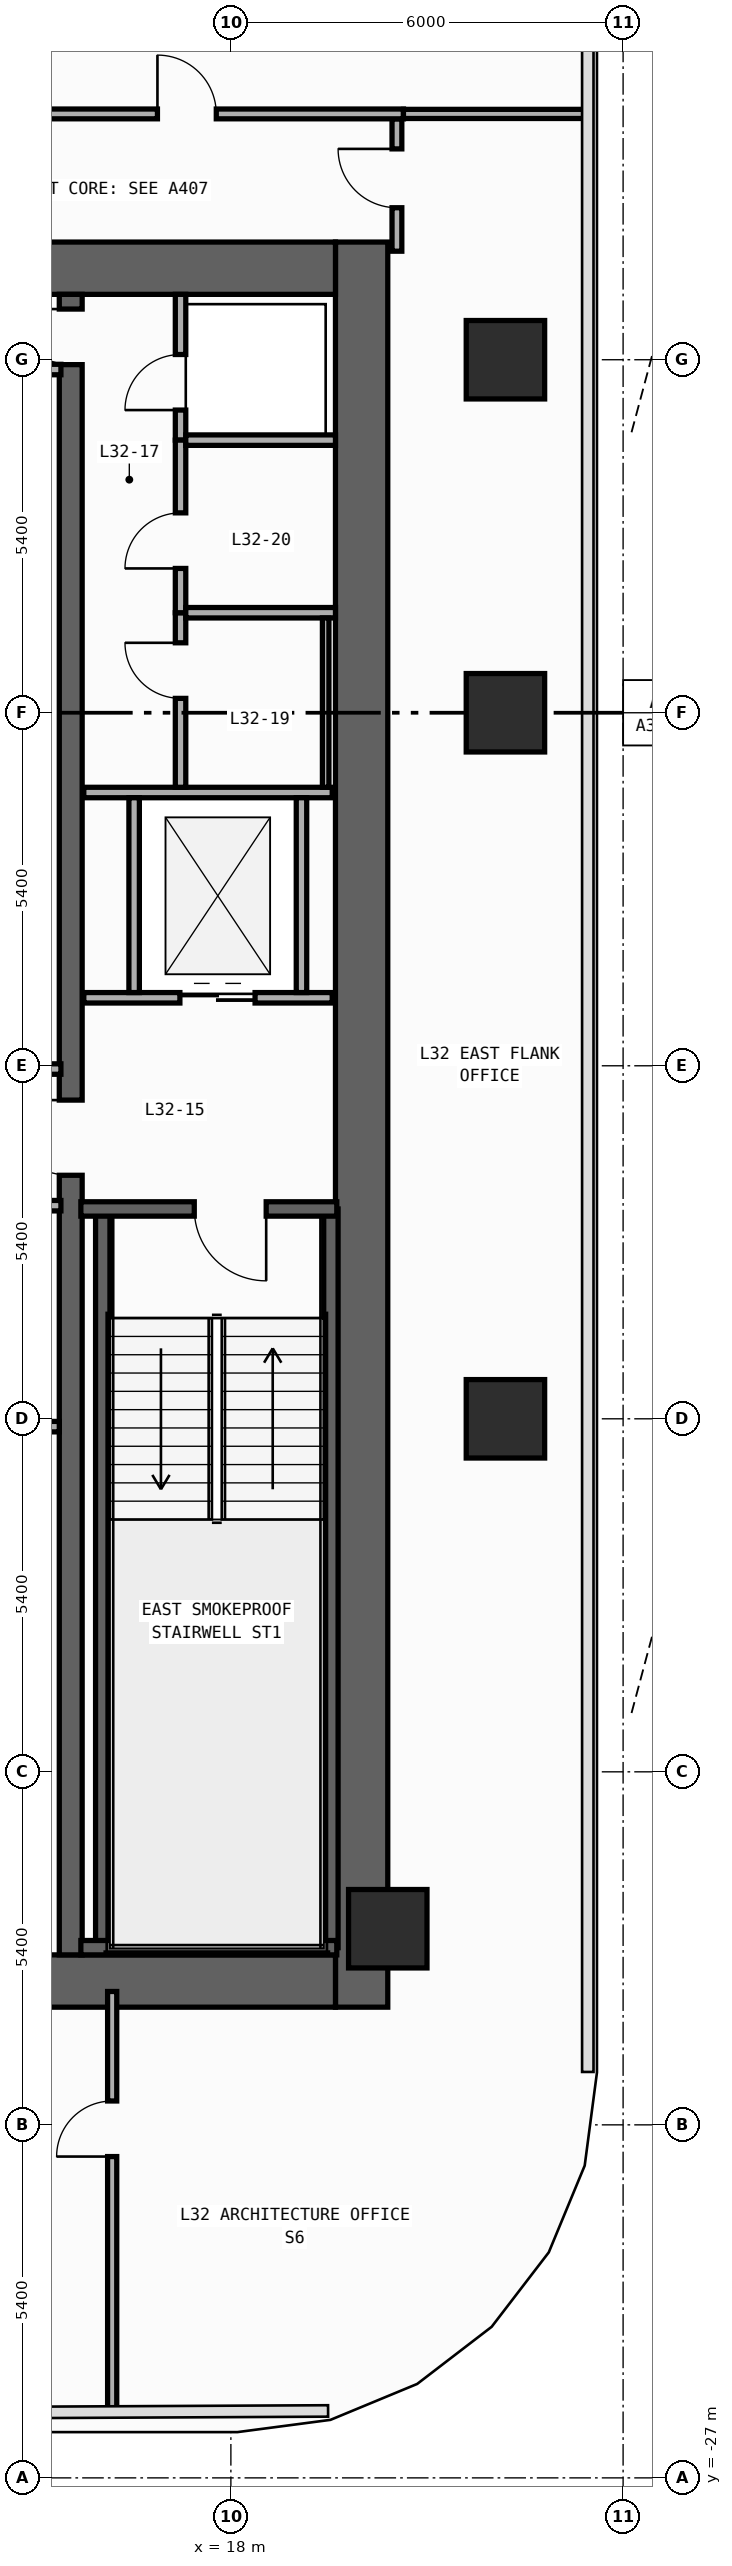
"""IFC4 building model, lengths in metres.
Left out: names, types, materials, properties, quantities, classifications, styles, units other than length and angle.
Written with IfcOpenShell. Run it as: python <this file> out.ifc"""

import sys

from ifc_helpers import new_model, si_unit, direction, frame, frame_2d, origin, origin_2d, place, context, subcontext, project, spatial, rectangle, extrude, element, fill, save


model = new_model("IFC4")
c1 = context("Model", 3, precision=1e-05, world=origin(), true_north=direction((0.0, 1.0)))
c2 = subcontext(c1, "Body", "Model", "MODEL_VIEW")
j1 = project(units=[si_unit("LENGTHUNIT", "METRE"), si_unit("PLANEANGLEUNIT", "RADIAN")], contexts=[c1])
p1 = place(None, origin())
s1 = spatial("IfcSite", under=j1, at=p1, CompositionType="ELEMENT")
p2 = place(p1, origin())
s2 = spatial("IfcBuilding", under=s1, at=p2, CompositionType="ELEMENT")
p3 = place(p2, frame((0.0, 0.0, 139.4)))
s3 = spatial("IfcBuildingStorey", under=s2, at=p3, CompositionType="ELEMENT", Elevation=139.4)
p4 = place(p3, frame((20.0, -19.8, 0.0), z_axis=(0.0, 0.0, 1.0), x_axis=(0.0, 1.0, 0.0)))
e1 = element("IfcWall", 1, at=p4, inside=s3, PredefinedType="SHEAR", context=c2, shape_type="SweptSolid", body=[
    extrude(rectangle(XDim=27.0, YDim=0.8, at=frame_2d((13.5, 0.0))), origin(), (0.0, 0.0, 1.0), 3.94),
])
for number, where, z_axis, x_axis in (
    (2, (12.8, -19.4, 0.0), (0.0, 0.0, 1.0), (1.0, 0.0, 0.0)),
    (3, (12.8, 6.8, 0.0), (0.0, 0.0, 1.0), (1.0, 0.0, 0.0)),
):
    element("IfcWall", number, at=place(p3, frame(where, z_axis=z_axis, x_axis=x_axis)), inside=s3, PredefinedType="SHEAR", context=c2, shape_type="SweptSolid", body=[
        extrude(rectangle(XDim=6.8, YDim=0.8, at=frame_2d((3.4, 0.0))), origin(), (0.0, 0.0, 1.0), 3.94),
    ])
p5 = place(p3, frame((15.55, -19.0, 0.0), z_axis=(0.0, 0.0, 1.0), x_axis=(0.0, 1.0, 0.0)))
e4 = element("IfcWall", 4, at=p5, inside=s3, PredefinedType="SHEAR", context=c2, shape_type="SweptSolid", body=[
    extrude(rectangle(XDim=25.4, YDim=0.35, at=frame_2d((12.7, 0.0))), origin(), (0.0, 0.0, 1.0), 3.94),
])
p6 = place(p5, frame((11.925, 0.0, 0.0)))
e5 = element("IfcOpeningElement", 5, at=p6, cuts=e4, PredefinedType="OPENING", context=c2, shape_type="SweptSolid", body=[
    extrude(rectangle(XDim=1.15, YDim=2.2, at=frame_2d((0.575, 1.1))), frame((0.0, 0.185, 0.0), z_axis=(0.0, -1.0, 0.0), x_axis=(1.0, 0.0, 0.0)), (0.0, 0.0, 1.0), 0.37),
])
p7 = place(p5, frame((24.325, 0.0, 0.0)))
e6 = element("IfcOpeningElement", 6, at=p7, cuts=e4, PredefinedType="OPENING", context=c2, shape_type="SweptSolid", body=[
    extrude(rectangle(XDim=0.85, YDim=2.1, at=frame_2d((0.425, 1.05))), frame((0.0, 0.185, 0.0), z_axis=(0.0, -1.0, 0.0), x_axis=(1.0, 0.0, 0.0)), (0.0, 0.0, 1.0), 0.37),
])
for number, where, z_axis, x_axis in (
    (7, (16.04, -18.89, 0.0), (0.0, 0.0, 1.0), (0.0, 1.0, 0.0)),
    (8, (19.53, -18.89, 0.0), (0.0, 0.0, 1.0), (0.0, 1.0, 0.0)),
):
    element("IfcWall", number, at=place(p3, frame(where, z_axis=z_axis, x_axis=x_axis)), inside=s3, PredefinedType="SHEAR", context=c2, shape_type="SweptSolid", body=[
        extrude(rectangle(XDim=11.3, YDim=0.22, at=frame_2d((5.65, 0.0))), origin(), (0.0, 0.0, 1.0), 3.94),
    ])
p8 = place(p3, frame((15.705, -18.89, 0.0), z_axis=(0.0, 0.0, 1.0), x_axis=(1.0, 0.0, 0.0)))
e9 = element("IfcWall", 9, at=p8, inside=s3, PredefinedType="SHEAR", context=c2, shape_type="SweptSolid", body=[
    extrude(rectangle(XDim=3.915, YDim=0.22, at=frame_2d((1.958, 0.0))), origin(), (0.0, 0.0, 1.0), 3.94),
])
p9 = place(p3, frame((19.62, -7.59, 0.0), z_axis=(0.0, 0.0, 1.0), x_axis=(-1.0, 0.0, 0.0)))
e10 = element("IfcWall", 10, at=p9, inside=s3, PredefinedType="SHEAR", context=c2, shape_type="SweptSolid", body=[
    extrude(rectangle(XDim=3.915, YDim=0.22, at=frame_2d((1.958, 0.0))), origin(), (0.0, 0.0, 1.0), 3.94),
])
p10 = place(p9, frame((1.08, 0.0, 0.0)))
e11 = element("IfcOpeningElement", 11, at=p10, cuts=e10, PredefinedType="OPENING", context=c2, shape_type="SweptSolid", body=[
    extrude(rectangle(XDim=1.1, YDim=2.2, at=frame_2d((0.55, 1.1))), frame((0.0, 0.12, 0.0), z_axis=(0.0, -1.0, 0.0), x_axis=(1.0, 0.0, 0.0)), (0.0, 0.0, 1.0), 0.24),
])
for number, where, z_axis, x_axis in (
    (12, (20.4, -18.6, 0.0), (0.0, 0.0, 1.0), (1.0, 0.0, 0.0)),
    (13, (22.2, -10.8, 0.0), (0.0, 0.0, 1.0), (1.0, 0.0, 0.0)),
    (14, (22.2, 0.0, 0.0), (0.0, 0.0, 1.0), (1.0, 0.0, 0.0)),
    (15, (22.2, 5.4, 0.0), (0.0, 0.0, 1.0), (1.0, 0.0, 0.0)),
):
    element("IfcColumn", number, at=place(p3, frame(where, z_axis=z_axis, x_axis=x_axis)), inside=s3, PredefinedType="COLUMN", context=c2, shape_type="SweptSolid", body=[
        extrude(rectangle(XDim=1.2, YDim=1.2, at=origin_2d()), origin(), (0.0, 0.0, 1.0), 4.2),
    ])
p11 = place(p3, frame((15.75, -4.36, 0.0), z_axis=(0.0, 0.0, 1.0), x_axis=(1.0, 0.0, 0.0)))
e16 = element("IfcWall", 16, at=p11, inside=s3, PredefinedType="STANDARD", context=c2, shape_type="SweptSolid", body=[
    extrude(rectangle(XDim=3.8, YDim=0.16, at=frame_2d((1.9, 0.0))), origin(), (0.0, 0.0, 1.0), 3.94),
])
p12 = place(p11, frame((1.47, 0.0, 0.0)))
e17 = element("IfcOpeningElement", 17, at=p12, cuts=e16, PredefinedType="OPENING", context=c2, shape_type="SweptSolid", body=[
    extrude(rectangle(XDim=1.15, YDim=2.2, at=frame_2d((0.575, 1.1))), frame((0.0, 0.09, 0.0), z_axis=(0.0, -1.0, 0.0), x_axis=(1.0, 0.0, 0.0)), (0.0, 0.0, 1.0), 0.18),
])
p13 = place(p3, frame((15.75, -1.22, 0.0), z_axis=(0.0, 0.0, 1.0), x_axis=(1.0, 0.0, 0.0)))
e18 = element("IfcWall", 18, at=p13, inside=s3, PredefinedType="STANDARD", context=c2, shape_type="SweptSolid", body=[
    extrude(rectangle(XDim=3.8, YDim=0.16, at=frame_2d((1.9, 0.0))), origin(), (0.0, 0.0, 1.0), 3.94),
])
for number, where, z_axis, x_axis in (
    (19, (16.52, -4.28, 0.0), (0.0, 0.0, 1.0), (0.0, 1.0, 0.0)),
    (20, (19.08, -4.28, 0.0), (0.0, 0.0, 1.0), (0.0, 1.0, 0.0)),
):
    element("IfcWall", number, at=place(p3, frame(where, z_axis=z_axis, x_axis=x_axis)), inside=s3, PredefinedType="STANDARD", context=c2, shape_type="SweptSolid", body=[
        extrude(rectangle(XDim=2.98, YDim=0.16, at=frame_2d((1.49, 0.0))), origin(), (0.0, 0.0, 1.0), 3.94),
    ])
for number, where, z_axis, x_axis in (
    (21, (12.8, -5.45, 0.0), (0.0, 0.0, 1.0), (1.0, 0.0, 0.0)),
    (22, (12.8, -7.54, 0.0), (0.0, 0.0, 1.0), (1.0, 0.0, 0.0)),
    (23, (12.8, 5.25, 0.0), (0.0, 0.0, 1.0), (1.0, 0.0, 0.0)),
):
    element("IfcWall", number, at=place(p3, frame(where, z_axis=z_axis, x_axis=x_axis)), inside=s3, PredefinedType="STANDARD", context=c2, shape_type="SweptSolid", body=[
        extrude(rectangle(XDim=2.6, YDim=0.16, at=frame_2d((1.3, 0.0))), origin(), (0.0, 0.0, 1.0), 3.94),
    ])
p14 = place(p3, frame((17.23, 4.17, 0.0), z_axis=(0.0, 0.0, 1.0), x_axis=(0.0, 1.0, 0.0)))
e24 = element("IfcWall", 24, at=p14, inside=s3, PredefinedType="PARTITIONING", context=c2, shape_type="SweptSolid", body=[
    extrude(rectangle(XDim=2.23, YDim=0.16, at=frame_2d((1.115, 0.0))), origin(), (0.0, 0.0, 1.0), 3.94),
])
p15 = place(p14, frame((0.46, 0.0, 0.0)))
e25 = element("IfcOpeningElement", 25, at=p15, cuts=e24, PredefinedType="OPENING", context=c2, shape_type="SweptSolid", body=[
    extrude(rectangle(XDim=0.85, YDim=2.1, at=frame_2d((0.425, 1.05))), frame((0.0, 0.09, 0.0), z_axis=(0.0, -1.0, 0.0), x_axis=(1.0, 0.0, 0.0)), (0.0, 0.0, 1.0), 0.18),
])
p16 = place(p3, frame((17.23, -1.14, 0.0), z_axis=(0.0, 0.0, 1.0), x_axis=(0.0, 1.0, 0.0)))
e26 = element("IfcWall", 26, at=p16, inside=s3, PredefinedType="PARTITIONING", context=c2, shape_type="SweptSolid", body=[
    extrude(rectangle(XDim=2.67, YDim=0.16, at=frame_2d((1.335, 0.0))), origin(), (0.0, 0.0, 1.0), 3.94),
])
p17 = place(p16, frame((1.36, 0.0, 0.0)))
e27 = element("IfcOpeningElement", 27, at=p17, cuts=e26, PredefinedType="OPENING", context=c2, shape_type="SweptSolid", body=[
    extrude(rectangle(XDim=0.85, YDim=2.1, at=frame_2d((0.425, 1.05))), frame((0.0, 0.09, 0.0), z_axis=(0.0, -1.0, 0.0), x_axis=(1.0, 0.0, 0.0)), (0.0, 0.0, 1.0), 0.18),
])
p18 = place(p3, frame((17.23, 1.53, 0.0), z_axis=(0.0, 0.0, 1.0), x_axis=(0.0, 1.0, 0.0)))
e28 = element("IfcWall", 28, at=p18, inside=s3, PredefinedType="PARTITIONING", context=c2, shape_type="SweptSolid", body=[
    extrude(rectangle(XDim=2.64, YDim=0.16, at=frame_2d((1.32, 0.0))), origin(), (0.0, 0.0, 1.0), 3.94),
])
p19 = place(p18, frame((0.677, 0.0, 0.0)))
e29 = element("IfcOpeningElement", 29, at=p19, cuts=e28, PredefinedType="OPENING", context=c2, shape_type="SweptSolid", body=[
    extrude(rectangle(XDim=0.85, YDim=2.1, at=frame_2d((0.425, 1.05))), frame((0.0, 0.09, 0.0), z_axis=(0.0, -1.0, 0.0), x_axis=(1.0, 0.0, 0.0)), (0.0, 0.0, 1.0), 0.18),
])
for number, where, z_axis, x_axis in (
    (30, (17.31, 4.17, 0.0), (0.0, 0.0, 1.0), (1.0, 0.0, 0.0)),
    (31, (17.31, 1.53, 0.0), (0.0, 0.0, 1.0), (1.0, 0.0, 0.0)),
):
    element("IfcWall", number, at=place(p3, frame(where, z_axis=z_axis, x_axis=x_axis)), inside=s3, PredefinedType="PARTITIONING", context=c2, shape_type="SweptSolid", body=[
        extrude(rectangle(XDim=2.29, YDim=0.16, at=frame_2d((1.145, 0.0))), origin(), (0.0, 0.0, 1.0), 3.94),
    ])
p20 = place(p3, frame((12.31, -10.92, 0.0), z_axis=(0.0, 0.0, 1.0), x_axis=(1.0, 0.0, 0.0)))
e32 = element("IfcWall", 32, at=p20, inside=s3, PredefinedType="PARTITIONING", context=c2, shape_type="SweptSolid", body=[
    extrude(rectangle(XDim=3.065, YDim=0.16, at=frame_2d((1.532, 0.0))), origin(), (0.0, 0.0, 1.0), 3.24),
])
p21 = place(p3, frame((20.54, 7.06, 0.0), z_axis=(0.0, 0.0, 1.0), x_axis=(0.0, 1.0, 0.0)))
e33 = element("IfcWall", 33, at=p21, inside=s3, PredefinedType="PARTITIONING", context=c2, shape_type="SweptSolid", body=[
    extrude(rectangle(XDim=2.025, YDim=0.15, at=frame_2d((1.012, 0.0))), origin(), (0.0, 0.0, 1.0), 3.94),
])
p22 = place(p21, frame((0.665, 0.0, 0.0)))
e34 = element("IfcOpeningElement", 34, at=p22, cuts=e33, PredefinedType="OPENING", context=c2, shape_type="SweptSolid", body=[
    extrude(rectangle(XDim=0.9, YDim=2.15, at=frame_2d((0.45, 1.075))), frame((0.0, 0.085, 0.0), z_axis=(0.0, -1.0, 0.0), x_axis=(1.0, 0.0, 0.0)), (0.0, 0.0, 1.0), 0.17),
])
p23 = place(p3, frame((11.81, 9.16, 0.0), z_axis=(0.0, 0.0, 1.0), x_axis=(1.0, 0.0, 0.0)))
e35 = element("IfcWall", 35, at=p23, inside=s3, PredefinedType="PARTITIONING", context=c2, shape_type="SweptSolid", body=[
    extrude(rectangle(XDim=8.83, YDim=0.15, at=frame_2d((4.415, 0.0))), origin(), (0.0, 0.0, 1.0), 3.94),
])
p24 = place(p23, frame((5.067, 0.0, 0.0)))
e36 = element("IfcOpeningElement", 36, at=p24, cuts=e35, PredefinedType="OPENING", context=c2, shape_type="SweptSolid", body=[
    extrude(rectangle(XDim=0.9, YDim=2.15, at=frame_2d((0.45, 1.075))), frame((0.0, 0.085, 0.0), z_axis=(0.0, -1.0, 0.0), x_axis=(1.0, 0.0, 0.0)), (0.0, 0.0, 1.0), 0.17),
])
p25 = place(p3, frame((20.64, 9.16, 0.0), z_axis=(0.0, 0.0, 1.0), x_axis=(1.0, 0.0, 0.0)))
e37 = element("IfcWall", 37, at=p25, inside=s3, PredefinedType="PARTITIONING", context=c2, shape_type="SweptSolid", body=[
    extrude(rectangle(XDim=2.815, YDim=0.14, at=frame_2d((1.408, 0.0))), origin(), (0.0, 0.0, 1.0), 3.94),
])
p26 = place(p3, frame((16.184, -25.987, 0.0), z_axis=(0.0, 0.0, 1.0), x_axis=(0.0, 1.0, 0.0)))
e38 = element("IfcWall", 38, at=p26, inside=s3, PredefinedType="PARTITIONING", context=c2, shape_type="SweptSolid", body=[
    extrude(rectangle(XDim=6.427, YDim=0.14, at=frame_2d((3.214, 0.0))), origin(), (0.0, 0.0, 1.0), 3.94),
])
p27 = place(p26, frame((3.902, 0.0, 0.0)))
e39 = element("IfcOpeningElement", 39, at=p27, cuts=e38, PredefinedType="OPENING", context=c2, shape_type="SweptSolid", body=[
    extrude(rectangle(XDim=0.85, YDim=2.1, at=frame_2d((0.425, 1.05))), frame((0.0, 0.08, 0.0), z_axis=(0.0, -1.0, 0.0), x_axis=(1.0, 0.0, 0.0)), (0.0, 0.0, 1.0), 0.16),
])
p28 = place(p3, frame((19.45, 1.45, 0.0), z_axis=(0.0, 0.0, 1.0), x_axis=(0.0, -1.0, 0.0)))
e40 = element("IfcWall", 40, at=p28, inside=s3, PredefinedType="PARTITIONING", context=c2, shape_type="SweptSolid", body=[
    extrude(rectangle(XDim=2.59, YDim=0.1, at=frame_2d((1.295, 0.0))), origin(), (0.0, 0.0, 1.0), 3.94),
])
p29 = place(p10, origin())
e41 = element("IfcDoor", 41, at=p29, inside=s3, OperationType="SINGLE_SWING_LEFT", PredefinedType="DOOR", context=c2, shape_type="SweptSolid", body=[
    extrude(rectangle(XDim=1.1, YDim=2.2, at=frame_2d((0.55, 1.1))), frame((0.0, 0.025, 0.0), z_axis=(0.0, -1.0, 0.0), x_axis=(1.0, 0.0, 0.0)), (0.0, 0.0, 1.0), 0.05),
])
fill(e11, e41)
p30 = place(p6, origin())
e42 = element("IfcDoor", 42, at=p30, inside=s3, OperationType="SINGLE_SWING_RIGHT", PredefinedType="DOOR", context=c2, shape_type="SweptSolid", body=[
    extrude(rectangle(XDim=1.15, YDim=2.2, at=frame_2d((0.575, 1.1))), frame((0.0, 0.025, 0.0), z_axis=(0.0, -1.0, 0.0), x_axis=(1.0, 0.0, 0.0)), (0.0, 0.0, 1.0), 0.05),
])
fill(e5, e42)
p31 = place(p7, origin())
e43 = element("IfcDoor", 43, at=p31, inside=s3, OperationType="SINGLE_SWING_RIGHT", PredefinedType="DOOR", context=c2, shape_type="SweptSolid", body=[
    extrude(rectangle(XDim=0.85, YDim=2.1, at=frame_2d((0.425, 1.05))), frame((0.0, 0.025, 0.0), z_axis=(0.0, -1.0, 0.0), x_axis=(1.0, 0.0, 0.0)), (0.0, 0.0, 1.0), 0.05),
])
fill(e6, e43)
p32 = place(p12, origin())
e44 = element("IfcDoor", 44, at=p32, inside=s3, OperationType="DOUBLE_DOOR_SLIDING", PredefinedType="DOOR", context=c2, shape_type="SweptSolid", body=[
    extrude(rectangle(XDim=1.15, YDim=2.2, at=frame_2d((0.575, 1.1))), frame((0.0, 0.025, 0.0), z_axis=(0.0, -1.0, 0.0), x_axis=(1.0, 0.0, 0.0)), (0.0, 0.0, 1.0), 0.05),
])
fill(e17, e44)
p33 = place(p15, origin())
e45 = element("IfcDoor", 45, at=p33, inside=s3, OperationType="SINGLE_SWING_LEFT", PredefinedType="DOOR", context=c2, shape_type="SweptSolid", body=[
    extrude(rectangle(XDim=0.85, YDim=2.1, at=frame_2d((0.425, 1.05))), frame((0.0, 0.025, 0.0), z_axis=(0.0, -1.0, 0.0), x_axis=(1.0, 0.0, 0.0)), (0.0, 0.0, 1.0), 0.05),
])
fill(e25, e45)
p34 = place(p17, origin())
e46 = element("IfcDoor", 46, at=p34, inside=s3, OperationType="SINGLE_SWING_RIGHT", PredefinedType="DOOR", context=c2, shape_type="SweptSolid", body=[
    extrude(rectangle(XDim=0.85, YDim=2.1, at=frame_2d((0.425, 1.05))), frame((0.0, 0.025, 0.0), z_axis=(0.0, -1.0, 0.0), x_axis=(1.0, 0.0, 0.0)), (0.0, 0.0, 1.0), 0.05),
])
fill(e27, e46)
p35 = place(p19, origin())
e47 = element("IfcDoor", 47, at=p35, inside=s3, OperationType="SINGLE_SWING_LEFT", PredefinedType="DOOR", context=c2, shape_type="SweptSolid", body=[
    extrude(rectangle(XDim=0.85, YDim=2.1, at=frame_2d((0.425, 1.05))), frame((0.0, 0.025, 0.0), z_axis=(0.0, -1.0, 0.0), x_axis=(1.0, 0.0, 0.0)), (0.0, 0.0, 1.0), 0.05),
])
fill(e29, e47)
p36 = place(p22, origin())
e48 = element("IfcDoor", 48, at=p36, inside=s3, OperationType="SINGLE_SWING_RIGHT", PredefinedType="DOOR", context=c2, shape_type="SweptSolid", body=[
    extrude(rectangle(XDim=0.9, YDim=2.15, at=frame_2d((0.45, 1.075))), frame((0.0, 0.025, 0.0), z_axis=(0.0, -1.0, 0.0), x_axis=(1.0, 0.0, 0.0)), (0.0, 0.0, 1.0), 0.05),
])
fill(e34, e48)
p37 = place(p24, origin())
e49 = element("IfcDoor", 49, at=p37, inside=s3, OperationType="SINGLE_SWING_LEFT", PredefinedType="DOOR", context=c2, shape_type="SweptSolid", body=[
    extrude(rectangle(XDim=0.9, YDim=2.15, at=frame_2d((0.45, 1.075))), frame((0.0, 0.025, 0.0), z_axis=(0.0, -1.0, 0.0), x_axis=(1.0, 0.0, 0.0)), (0.0, 0.0, 1.0), 0.05),
])
fill(e36, e49)
p38 = place(p27, origin())
e50 = element("IfcDoor", 50, at=p38, inside=s3, OperationType="SINGLE_SWING_LEFT", PredefinedType="DOOR", context=c2, shape_type="SweptSolid", body=[
    extrude(rectangle(XDim=0.85, YDim=2.1, at=frame_2d((0.425, 1.05))), frame((0.0, 0.025, 0.0), z_axis=(0.0, -1.0, 0.0), x_axis=(1.0, 0.0, 0.0)), (0.0, 0.0, 1.0), 0.05),
])
fill(e39, e50)
save(model, sys.argv[1])
